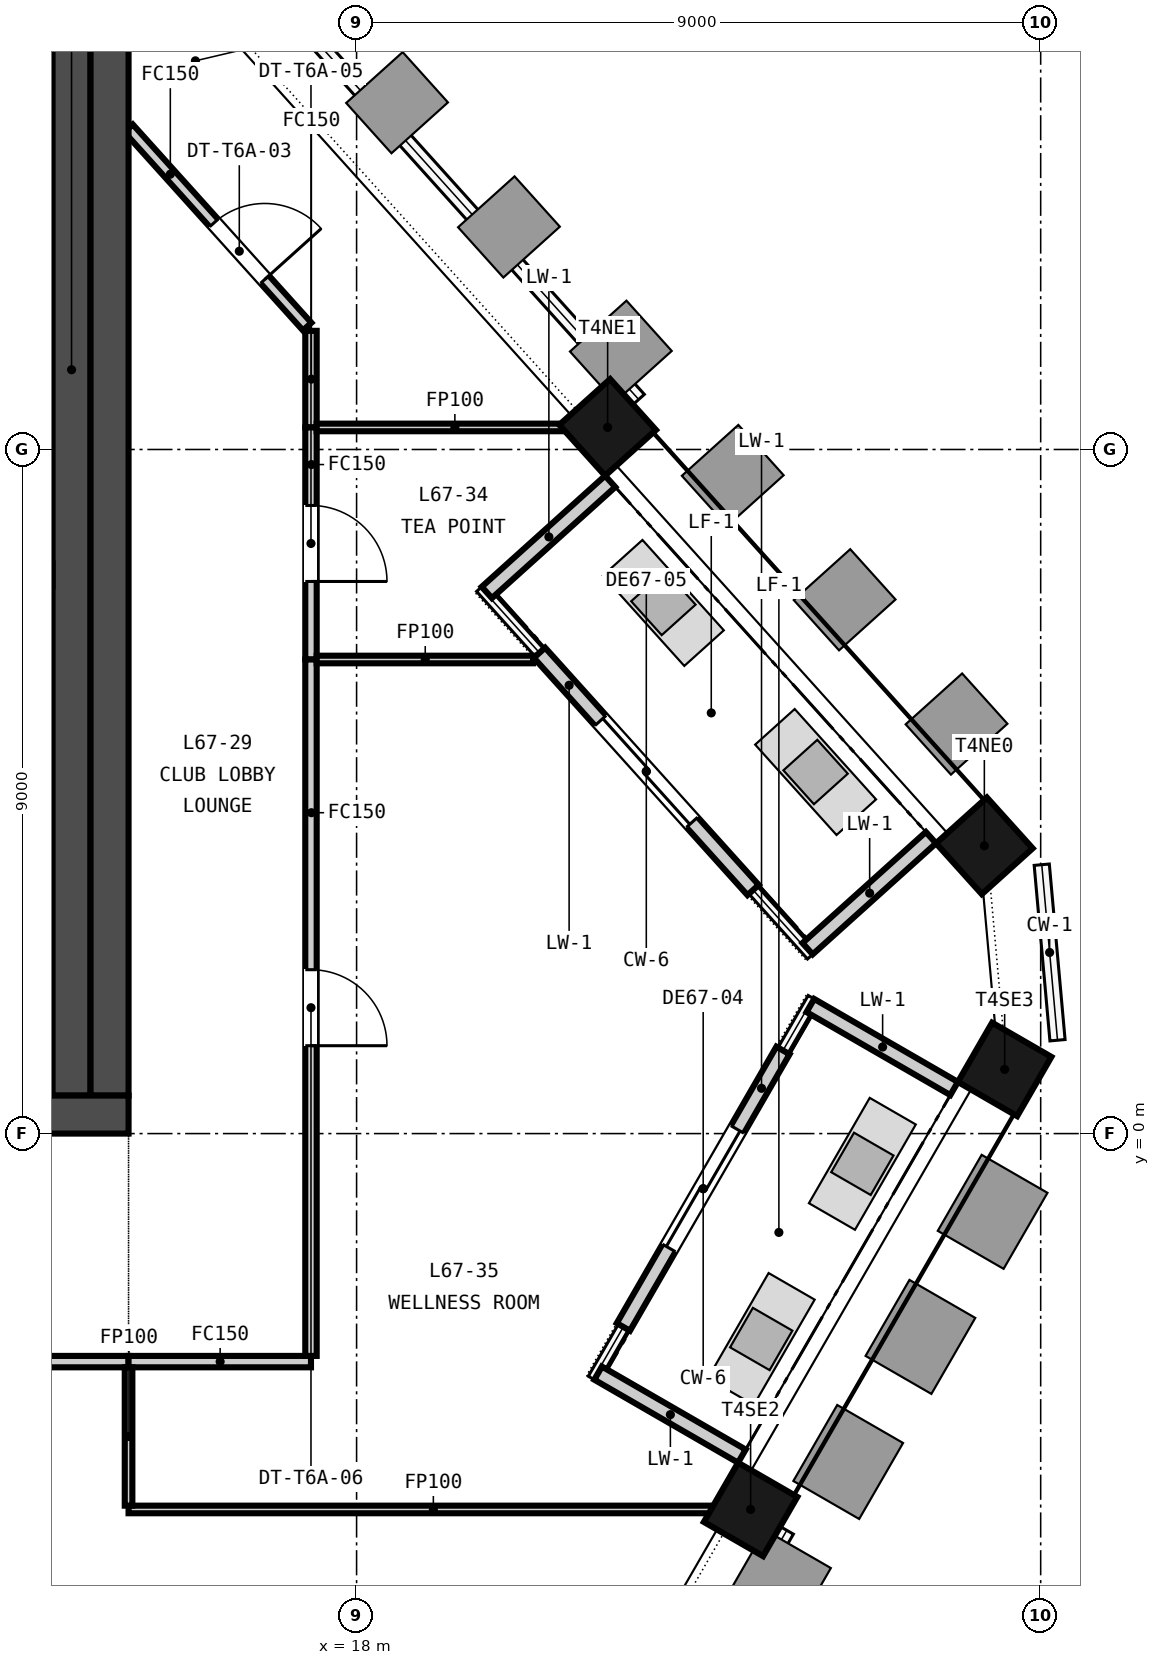
"""IFC4 building model, lengths in metres.
Left out: names, types, materials, properties, quantities, classifications, styles, units other than length and angle.
Written with IfcOpenShell. Run it as: python <this file> out.ifc"""

import sys

from ifc_helpers import new_model, si_unit, direction, frame, frame_2d, origin, origin_2d, place, context, subcontext, project, spatial, rectangle, extrude, element, fill, save


model = new_model("IFC4")
c1 = context("Model", 3, precision=1e-05, world=origin(), true_north=direction((0.0, 1.0)))
c2 = subcontext(c1, "Body", "Model", "MODEL_VIEW")
j1 = project(units=[si_unit("LENGTHUNIT", "METRE"), si_unit("PLANEANGLEUNIT", "RADIAN")], contexts=[c1])
p1 = place(None, origin())
s1 = spatial("IfcSite", under=j1, at=p1, CompositionType="ELEMENT")
p2 = place(p1, origin())
s2 = spatial("IfcBuilding", under=s1, at=p2, CompositionType="ELEMENT")
p3 = place(p2, frame((0.0, 0.0, 264.6)))
s3 = spatial("IfcBuildingStorey", under=s2, at=p3, CompositionType="ELEMENT", Elevation=264.6)
p4 = place(p3, frame((-15.0, 0.25, -0.15), z_axis=(0.0, 0.0, 1.0), x_axis=(1.0, 0.0, 0.0)))
e1 = element("IfcWall", 1, at=p4, inside=s3, PredefinedType="SOLIDWALL", context=c2, shape_type="SweptSolid", body=[
    extrude(rectangle(XDim=30.0, YDim=0.5, at=frame_2d((15.0, 0.0))), origin(), (0.0, 0.0, 1.0), 3.65),
])
p5 = place(p4, frame((5.8, 0.0, 0.15)))
e2 = element("IfcOpeningElement", 2, at=p5, cuts=e1, PredefinedType="OPENING", context=c2, shape_type="SweptSolid", body=[
    extrude(rectangle(XDim=2.4, YDim=2.4, at=frame_2d((1.2, 1.2))), frame((0.0, 0.26, 0.0), z_axis=(0.0, -1.0, 0.0), x_axis=(1.0, 0.0, 0.0)), (0.0, 0.0, 1.0), 0.52),
])
p6 = place(p4, frame((13.8, 0.0, 0.15)))
e3 = element("IfcOpeningElement", 3, at=p6, cuts=e1, PredefinedType="OPENING", context=c2, shape_type="SweptSolid", body=[
    extrude(rectangle(XDim=2.4, YDim=2.4, at=frame_2d((1.2, 1.2))), frame((0.0, 0.26, 0.0), z_axis=(0.0, -1.0, 0.0), x_axis=(1.0, 0.0, 0.0)), (0.0, 0.0, 1.0), 0.52),
])
p7 = place(p4, frame((21.8, 0.0, 0.15)))
e4 = element("IfcOpeningElement", 4, at=p7, cuts=e1, PredefinedType="OPENING", context=c2, shape_type="SweptSolid", body=[
    extrude(rectangle(XDim=2.4, YDim=2.4, at=frame_2d((1.2, 1.2))), frame((0.0, 0.26, 0.0), z_axis=(0.0, -1.0, 0.0), x_axis=(1.0, 0.0, 0.0)), (0.0, 0.0, 1.0), 0.52),
])
p8 = place(p4, frame((1.5, 0.0, 0.15)))
e5 = element("IfcOpeningElement", 5, at=p8, cuts=e1, PredefinedType="OPENING", context=c2, shape_type="SweptSolid", body=[
    extrude(rectangle(XDim=1.2, YDim=2.1, at=frame_2d((0.6, 1.05))), frame((0.0, 0.26, 0.0), z_axis=(0.0, -1.0, 0.0), x_axis=(1.0, 0.0, 0.0)), (0.0, 0.0, 1.0), 0.52),
])
p9 = place(p4, frame((27.3, 0.0, 0.15)))
e6 = element("IfcOpeningElement", 6, at=p9, cuts=e1, PredefinedType="OPENING", context=c2, shape_type="SweptSolid", body=[
    extrude(rectangle(XDim=1.2, YDim=2.1, at=frame_2d((0.6, 1.05))), frame((0.0, 0.26, 0.0), z_axis=(0.0, -1.0, 0.0), x_axis=(1.0, 0.0, 0.0)), (0.0, 0.0, 1.0), 0.52),
])
p10 = place(p3, frame((14.75, 0.5, -0.15), z_axis=(0.0, 0.0, 1.0), x_axis=(0.0, 1.0, 0.0)))
e7 = element("IfcWall", 7, at=p10, inside=s3, PredefinedType="SOLIDWALL", context=c2, shape_type="SweptSolid", body=[
    extrude(rectangle(XDim=14.0, YDim=0.5, at=frame_2d((7.0, 0.0))), origin(), (0.0, 0.0, 1.0), 3.65),
])
for number, where, z_axis, x_axis in (
    (8, (23.184, -4.945, -0.15), (0.0, 0.0, 1.0), (0.5, 0.866, 0.0)),
    (9, (26.526, 0.844, -0.15), (0.0, 0.0, 1.0), (0.5, 0.866, 0.0)),
    (10, (26.259, 3.786, -0.15), (0.0, 0.0, 1.0), (-0.669, 0.743, 0.0)),
    (11, (21.303, 9.29, -0.15), (0.0, 0.0, 1.0), (-0.669, 0.743, 0.0)),
):
    element("IfcColumn", number, at=place(p3, frame(where, z_axis=z_axis, x_axis=x_axis)), inside=s3, PredefinedType="COLUMN", context=c2, shape_type="SweptSolid", body=[
        extrude(rectangle(XDim=0.9, YDim=0.9, at=origin_2d()), origin(), (0.0, 0.0, 1.0), 3.65),
    ])
p11 = place(p3, frame((21.51, -2.544, 0.0), z_axis=(0.0, 0.0, 1.0), x_axis=(0.500002543286, 0.866023935413, 0.0)))
e12 = element("IfcWall", 12, at=p11, inside=s3, PredefinedType="SOLIDWALL", context=c2, shape_type="SweptSolid", body=[
    extrude(rectangle(XDim=4.2, YDim=0.2, at=frame_2d((2.1, 0.0))), origin(), (0.0, 0.0, 1.0), 2.821),
])
p12 = place(p11, frame((1.2, 0.0, 0.0)))
e13 = element("IfcOpeningElement", 13, at=p12, cuts=e12, PredefinedType="OPENING", context=c2, shape_type="SweptSolid", body=[
    extrude(rectangle(XDim=1.8, YDim=2.4, at=frame_2d((0.9, 1.2))), frame((0.0, 0.11, 0.0), z_axis=(0.0, -1.0, 0.0), x_axis=(1.0, 0.0, 0.0)), (0.0, 0.0, 1.0), 0.22),
])
for number, where, z_axis, x_axis in (
    (14, (23.069, -4.243, 0.0), (0.0, 0.0, 1.0), (-0.866, 0.5, 0.0)),
    (15, (25.861, 0.593, 0.0), (0.0, 0.0, 1.0), (-0.866, 0.5, 0.0)),
):
    element("IfcWall", number, at=place(p3, frame(where, z_axis=z_axis, x_axis=x_axis)), inside=s3, PredefinedType="SOLIDWALL", context=c2, shape_type="SweptSolid", body=[
        extrude(rectangle(XDim=2.184, YDim=0.2, at=frame_2d((1.092, 0.0))), origin(), (0.0, 0.0, 1.0), 3.05),
    ])
p13 = place(p3, frame((23.217, 3.204, 0.0), z_axis=(0.0, 0.0, 1.0), x_axis=(-0.669138140895, 0.743138041282, 0.0)))
e16 = element("IfcWall", 16, at=p13, inside=s3, PredefinedType="SOLIDWALL", context=c2, shape_type="SweptSolid", body=[
    extrude(rectangle(XDim=4.2, YDim=0.2, at=frame_2d((2.1, 0.0))), origin(), (0.0, 0.0, 1.0), 3.05),
])
p14 = place(p13, frame((1.2, 0.0, 0.0)))
e17 = element("IfcOpeningElement", 17, at=p14, cuts=e16, PredefinedType="OPENING", context=c2, shape_type="SweptSolid", body=[
    extrude(rectangle(XDim=1.8, YDim=2.4, at=frame_2d((0.9, 1.2))), frame((0.0, 0.11, 0.0), z_axis=(0.0, -1.0, 0.0), x_axis=(1.0, 0.0, 0.0)), (0.0, 0.0, 1.0), 0.22),
])
for number, where, z_axis, x_axis in (
    (18, (25.556, 3.894, 0.0), (0.0, 0.0, 1.0), (-0.743, -0.669, 0.0)),
    (19, (21.336, 8.58, 0.0), (0.0, 0.0, 1.0), (-0.743, -0.669, 0.0)),
):
    element("IfcWall", number, at=place(p3, frame(where, z_axis=z_axis, x_axis=x_axis)), inside=s3, PredefinedType="SOLIDWALL", context=c2, shape_type="SweptSolid", body=[
        extrude(rectangle(XDim=2.184, YDim=0.2, at=frame_2d((1.092, 0.0))), origin(), (0.0, 0.0, 1.0), 3.05),
    ])
p15 = place(p3, frame((11.05, 7.35, 0.0), z_axis=(0.0, 0.0, 1.0), x_axis=(1.0, 0.0, 0.0)))
e20 = element("IfcWall", 20, at=p15, inside=s3, PredefinedType="SOLIDWALL", context=c2, shape_type="SweptSolid", body=[
    extrude(rectangle(XDim=2.95, YDim=0.3, at=frame_2d((1.475, 0.0))), origin(), (0.0, 0.0, 1.0), 3.5),
])
p16 = place(p3, frame((14.25, 0.5, 0.0), z_axis=(0.0, 0.0, 1.0), x_axis=(0.0, 1.0, 0.0)))
e21 = element("IfcWall", 21, at=p16, inside=s3, PredefinedType="SOLIDWALL", context=c2, shape_type="SweptSolid", body=[
    extrude(rectangle(XDim=14.0, YDim=0.5, at=frame_2d((7.0, 0.0))), origin(), (0.0, 0.0, 1.0), 3.5),
])
p17 = place(p3, frame((15.0, -3.0, 0.0), z_axis=(0.0, 0.0, 1.0), x_axis=(-1.0, 0.0, 0.0)))
e22 = element("IfcWall", 22, at=p17, inside=s3, PredefinedType="PARTITIONING", context=c2, shape_type="SweptSolid", body=[
    extrude(rectangle(XDim=30.0, YDim=0.15, at=frame_2d((15.0, 0.0))), origin(), (0.0, 0.0, 1.0), 2.75),
])
p18 = place(p17, frame((14.1, 0.0, 0.0)))
e23 = element("IfcOpeningElement", 23, at=p18, cuts=e22, PredefinedType="OPENING", context=c2, shape_type="SweptSolid", body=[
    extrude(rectangle(XDim=1.8, YDim=2.1, at=frame_2d((0.9, 1.05))), frame((0.0, 0.085, 0.0), z_axis=(0.0, -1.0, 0.0), x_axis=(1.0, 0.0, 0.0)), (0.0, 0.0, 1.0), 0.17),
])
p19 = place(p3, frame((17.4, 10.561, 0.0), z_axis=(0.0, 0.0, 1.0), x_axis=(0.0, -1.0, 0.0)))
e24 = element("IfcWall", 24, at=p19, inside=s3, PredefinedType="PARTITIONING", context=c2, shape_type="SweptSolid", body=[
    extrude(rectangle(XDim=1.271, YDim=0.15, at=frame_2d((0.635, 0.0))), origin(), (0.0, 0.0, 1.0), 2.75),
])
p20 = place(p3, frame((17.4, 9.29, 0.0), z_axis=(0.0, 0.0, 1.0), x_axis=(0.0, -1.0, 0.0)))
e25 = element("IfcWall", 25, at=p20, inside=s3, PredefinedType="PARTITIONING", context=c2, shape_type="SweptSolid", body=[
    extrude(rectangle(XDim=3.053, YDim=0.15, at=frame_2d((1.526, 0.0))), origin(), (0.0, 0.0, 1.0), 2.75),
])
p21 = place(p20, frame((1.027, 0.0, 0.0)))
e26 = element("IfcOpeningElement", 26, at=p21, cuts=e25, PredefinedType="OPENING", context=c2, shape_type="SweptSolid", body=[
    extrude(rectangle(XDim=1.0, YDim=2.1, at=frame_2d((0.5, 1.05))), frame((0.0, 0.085, 0.0), z_axis=(0.0, -1.0, 0.0), x_axis=(1.0, 0.0, 0.0)), (0.0, 0.0, 1.0), 0.17),
])
p22 = place(p3, frame((17.4, -3.0, 0.0), z_axis=(0.0, 0.0, 1.0), x_axis=(-1.0, 0.0, 0.0)))
e27 = element("IfcWall", 27, at=p22, inside=s3, PredefinedType="PARTITIONING", context=c2, shape_type="SweptSolid", body=[
    extrude(rectangle(XDim=2.4, YDim=0.15, at=frame_2d((1.2, 0.0))), origin(), (0.0, 0.0, 1.0), 2.75),
])
p23 = place(p3, frame((17.4, 6.237, 0.0), z_axis=(0.0, 0.0, 1.0), x_axis=(0.0, -1.0, 0.0)))
e28 = element("IfcWall", 28, at=p23, inside=s3, PredefinedType="PARTITIONING", context=c2, shape_type="SweptSolid", body=[
    extrude(rectangle(XDim=9.162, YDim=0.15, at=frame_2d((4.581, 0.0))), origin(), (0.0, 0.0, 1.0), 2.75),
])
p24 = place(p23, frame((4.081, 0.0, 0.0)))
e29 = element("IfcOpeningElement", 29, at=p24, cuts=e28, PredefinedType="OPENING", context=c2, shape_type="SweptSolid", body=[
    extrude(rectangle(XDim=1.0, YDim=2.1, at=frame_2d((0.5, 1.05))), frame((0.0, 0.085, 0.0), z_axis=(0.0, -1.0, 0.0), x_axis=(1.0, 0.0, 0.0)), (0.0, 0.0, 1.0), 0.17),
])
p25 = place(p3, frame((15.0, 13.226, 0.0), z_axis=(0.0, 0.0, 1.0), x_axis=(0.669187491984, -0.743093601488, 0.0)))
e30 = element("IfcWall", 30, at=p25, inside=s3, PredefinedType="PARTITIONING", context=c2, shape_type="SweptSolid", body=[
    extrude(rectangle(XDim=3.511, YDim=0.15, at=frame_2d((1.756, 0.0))), origin(), (0.0, 0.0, 1.0), 2.75),
])
p26 = place(p25, frame((1.677, 0.0, 0.0)))
e31 = element("IfcOpeningElement", 31, at=p26, cuts=e30, PredefinedType="OPENING", context=c2, shape_type="SweptSolid", body=[
    extrude(rectangle(XDim=1.0, YDim=2.1, at=frame_2d((0.5, 1.05))), frame((0.0, 0.085, 0.0), z_axis=(0.0, -1.0, 0.0), x_axis=(1.0, 0.0, 0.0)), (0.0, 0.0, 1.0), 0.17),
])
p27 = place(p3, frame((17.475, 9.29, 0.0), z_axis=(0.0, 0.0, 1.0), x_axis=(1.0, 0.0, 0.0)))
e32 = element("IfcWall", 32, at=p27, inside=s3, PredefinedType="PARTITIONING", context=c2, shape_type="SweptSolid", body=[
    extrude(rectangle(XDim=3.626, YDim=0.1, at=frame_2d((1.813, 0.0))), origin(), (0.0, 0.0, 1.0), 2.75),
])
p28 = place(p3, frame((17.475, 6.237, 0.0), z_axis=(0.0, 0.0, 1.0), x_axis=(1.0, 0.0, 0.0)))
e33 = element("IfcWall", 33, at=p28, inside=s3, PredefinedType="PARTITIONING", context=c2, shape_type="SweptSolid", body=[
    extrude(rectangle(XDim=2.846, YDim=0.1, at=frame_2d((1.423, 0.0))), origin(), (0.0, 0.0, 1.0), 2.75),
])
p29 = place(p3, frame((15.0, -4.945, 0.0), z_axis=(0.0, 0.0, 1.0), x_axis=(1.0, 0.0, 0.0)))
e34 = element("IfcWall", 34, at=p29, inside=s3, PredefinedType="PARTITIONING", context=c2, shape_type="SweptSolid", body=[
    extrude(rectangle(XDim=8.01, YDim=0.1, at=frame_2d((4.005, 0.0))), origin(), (0.0, 0.0, 1.0), 2.75),
])
p30 = place(p3, frame((15.0, -4.895, 0.0), z_axis=(0.0, 0.0, 1.0), x_axis=(0.0, 1.0, 0.0)))
e35 = element("IfcWall", 35, at=p30, inside=s3, PredefinedType="PARTITIONING", context=c2, shape_type="SweptSolid", body=[
    extrude(rectangle(XDim=1.82, YDim=0.1, at=frame_2d((0.91, 0.0))), origin(), (0.0, 0.0, 1.0), 2.75),
])
p31 = place(p12, origin())
e36 = element("IfcDoor", 36, at=p31, inside=s3, OperationType="SINGLE_SWING_LEFT", PredefinedType="DOOR", context=c2, shape_type="SweptSolid", body=[
    extrude(rectangle(XDim=1.8, YDim=2.4, at=frame_2d((0.9, 1.2))), frame((0.0, 0.025, 0.0), z_axis=(0.0, -1.0, 0.0), x_axis=(1.0, 0.0, 0.0)), (0.0, 0.0, 1.0), 0.05),
])
fill(e13, e36)
p32 = place(p14, origin())
e37 = element("IfcDoor", 37, at=p32, inside=s3, OperationType="SINGLE_SWING_LEFT", PredefinedType="DOOR", context=c2, shape_type="SweptSolid", body=[
    extrude(rectangle(XDim=1.8, YDim=2.4, at=frame_2d((0.9, 1.2))), frame((0.0, 0.025, 0.0), z_axis=(0.0, -1.0, 0.0), x_axis=(1.0, 0.0, 0.0)), (0.0, 0.0, 1.0), 0.05),
])
fill(e17, e37)
p33 = place(p26, origin())
e38 = element("IfcDoor", 38, at=p33, inside=s3, OperationType="SINGLE_SWING_RIGHT", PredefinedType="DOOR", context=c2, shape_type="SweptSolid", body=[
    extrude(rectangle(XDim=1.0, YDim=2.1, at=frame_2d((0.5, 1.05))), frame((0.0, 0.025, 0.0), z_axis=(0.0, -1.0, 0.0), x_axis=(1.0, 0.0, 0.0)), (0.0, 0.0, 1.0), 0.05),
])
fill(e31, e38)
p34 = place(p21, origin())
e39 = element("IfcDoor", 39, at=p34, inside=s3, OperationType="SINGLE_SWING_RIGHT", PredefinedType="DOOR", context=c2, shape_type="SweptSolid", body=[
    extrude(rectangle(XDim=1.0, YDim=2.1, at=frame_2d((0.5, 1.05))), frame((0.0, 0.025, 0.0), z_axis=(0.0, -1.0, 0.0), x_axis=(1.0, 0.0, 0.0)), (0.0, 0.0, 1.0), 0.05),
])
fill(e26, e39)
p35 = place(p24, origin())
e40 = element("IfcDoor", 40, at=p35, inside=s3, OperationType="SINGLE_SWING_RIGHT", PredefinedType="DOOR", context=c2, shape_type="SweptSolid", body=[
    extrude(rectangle(XDim=1.0, YDim=2.1, at=frame_2d((0.5, 1.05))), frame((0.0, 0.025, 0.0), z_axis=(0.0, -1.0, 0.0), x_axis=(1.0, 0.0, 0.0)), (0.0, 0.0, 1.0), 0.05),
])
fill(e29, e40)
save(model, sys.argv[1])
